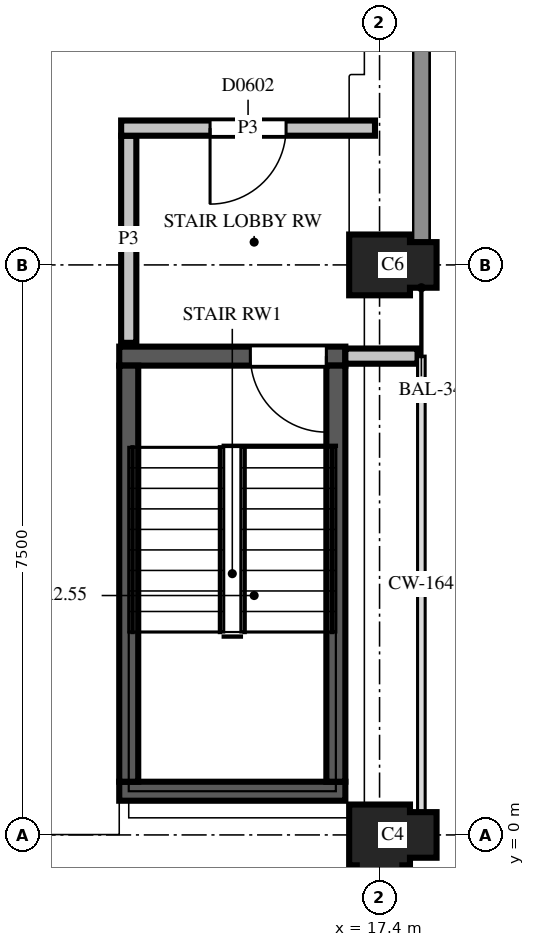
"""IFC4 building model, lengths in metres.
Left out: names, types, materials, properties, quantities, classifications, styles, units other than length and angle.
Written with IfcOpenShell. Run it as: python <this file> out.ifc"""

import sys

from ifc_helpers import new_model, si_unit, direction, frame, frame_2d, origin, place, context, subcontext, project, spatial, polyline, rectangle, outline, extrude, element, fill, save


model = new_model("IFC4")
c1 = context("Model", 3, precision=1e-05, world=origin(), true_north=direction((0.0, 1.0)))
c2 = subcontext(c1, "Body", "Model", "MODEL_VIEW")
j1 = project(units=[si_unit("LENGTHUNIT", "METRE"), si_unit("PLANEANGLEUNIT", "RADIAN")], contexts=[c1])
p1 = place(None, origin())
s1 = spatial("IfcSite", under=j1, at=p1, CompositionType="ELEMENT")
p2 = place(p1, origin())
s2 = spatial("IfcBuilding", under=s1, at=p2, CompositionType="ELEMENT")
p3 = place(p2, frame((0.0, 0.0, 23.0)))
s3 = spatial("IfcBuildingStorey", under=s2, at=p3, CompositionType="ELEMENT", Elevation=23.0)
p4 = place(p3, frame((17.4, 0.0, 0.0), z_axis=(0.0, 0.0, 1.0), x_axis=(0.0, -1.0, 0.0)))
e1 = element("IfcColumn", 1, at=p4, inside=s3, PredefinedType="COLUMN", context=c2, shape_type="SweptSolid", body=[
    extrude(outline(polyline([(-0.4, -0.4), (0.4, -0.4), (0.4, -0.3), (0.75, -0.3), (0.75, 0.3), (0.4, 0.3), (0.4, 0.4), (0.3, 0.4), (0.3, 0.75), (-0.3, 0.75), (-0.3, 0.4), (-0.4, 0.4), (-0.4, -0.4)])), origin(), (0.0, 0.0, 1.0), 3.7),
])
p5 = place(p3, frame((17.4, 7.5, 0.0), z_axis=(0.0, 0.0, 1.0), x_axis=(1.0, 0.0, 0.0)))
e2 = element("IfcColumn", 2, at=p5, inside=s3, PredefinedType="COLUMN", context=c2, shape_type="SweptSolid", body=[
    extrude(outline(polyline([(-0.4, -0.4), (0.4, -0.4), (0.4, -0.3), (0.75, -0.3), (0.75, 0.3), (0.4, 0.3), (0.4, 0.4), (-0.4, 0.4), (-0.4, -0.4)])), origin(), (0.0, 0.0, 1.0), 3.7),
])
p6 = place(p3, frame((13.975, 0.575, 0.0), z_axis=(0.0, 0.0, 1.0), x_axis=(1.0, 0.0, 0.0)))
e3 = element("IfcWall", 3, at=p6, inside=s3, PredefinedType="SHEAR", context=c2, shape_type="SweptSolid", body=[
    extrude(rectangle(XDim=2.975, YDim=0.25, at=frame_2d((1.487, 0.0))), origin(), (0.0, 0.0, 1.0), 3.7),
])
p7 = place(p3, frame((13.975, 6.3, 0.0), z_axis=(0.0, 0.0, 1.0), x_axis=(1.0, 0.0, 0.0)))
e4 = element("IfcWall", 4, at=p7, inside=s3, PredefinedType="SHEAR", context=c2, shape_type="SweptSolid", body=[
    extrude(rectangle(XDim=2.975, YDim=0.25, at=frame_2d((1.487, 0.0))), origin(), (0.0, 0.0, 1.0), 3.7),
])
p8 = place(p7, frame((1.725, 0.0, 0.0)))
e5 = element("IfcOpeningElement", 5, at=p8, cuts=e4, PredefinedType="OPENING", context=c2, shape_type="SweptSolid", body=[
    extrude(rectangle(XDim=1.0, YDim=2.1, at=frame_2d((0.5, 1.05))), frame((0.0, 0.135, 0.0), z_axis=(0.0, -1.0, 0.0), x_axis=(1.0, 0.0, 0.0)), (0.0, 0.0, 1.0), 0.27),
])
for number, where, z_axis, x_axis in (
    (6, (14.1, 0.7, 0.0), (0.0, 0.0, 1.0), (0.0, 1.0, 0.0)),
    (7, (16.825, 0.7, 0.0), (0.0, 0.0, 1.0), (0.0, 1.0, 0.0)),
):
    element("IfcWall", number, at=place(p3, frame(where, z_axis=z_axis, x_axis=x_axis)), inside=s3, PredefinedType="SHEAR", context=c2, shape_type="SweptSolid", body=[
        extrude(rectangle(XDim=5.475, YDim=0.25, at=frame_2d((2.738, 0.0))), origin(), (0.0, 0.0, 1.0), 3.7),
    ])
p9 = place(p3, frame((16.95, 6.3, 0.0), z_axis=(0.0, 0.0, 1.0), x_axis=(1.0, 0.0, 0.0)))
e8 = element("IfcWall", 8, at=p9, inside=s3, PredefinedType="PARTITIONING", context=c2, shape_type="SweptSolid", body=[
    extrude(rectangle(XDim=0.95, YDim=0.2, at=frame_2d((0.475, 0.0))), origin(), (0.0, 0.0, 1.0), 2.88),
])
p10 = place(p3, frame((14.1, 9.2, 0.0), z_axis=(0.0, 0.0, 1.0), x_axis=(0.0, -1.0, 0.0)))
e9 = element("IfcWall", 9, at=p10, inside=s3, PredefinedType="PARTITIONING", context=c2, shape_type="SweptSolid", body=[
    extrude(rectangle(XDim=2.725, YDim=0.2, at=frame_2d((1.362, 0.0))), origin(), (0.0, 0.0, 1.0), 2.88),
])
p11 = place(p3, frame((17.34, 9.3, 0.0), z_axis=(0.0, 0.0, 1.0), x_axis=(-1.0, 0.0, 0.0)))
e10 = element("IfcWall", 10, at=p11, inside=s3, PredefinedType="PARTITIONING", context=c2, shape_type="SweptSolid", body=[
    extrude(rectangle(XDim=3.34, YDim=0.2, at=frame_2d((1.67, 0.0))), origin(), (0.0, 0.0, 1.0), 2.88),
])
p12 = place(p11, frame((1.17, 0.0, 0.0)))
e11 = element("IfcOpeningElement", 11, at=p12, cuts=e10, PredefinedType="OPENING", context=c2, shape_type="SweptSolid", body=[
    extrude(rectangle(XDim=1.0, YDim=2.1, at=frame_2d((0.5, 1.05))), frame((0.0, 0.11, 0.0), z_axis=(0.0, -1.0, 0.0), x_axis=(1.0, 0.0, 0.0)), (0.0, 0.0, 1.0), 0.22),
])
p13 = place(p12, origin())
e12 = element("IfcDoor", 12, at=p13, inside=s3, OperationType="SINGLE_SWING_LEFT", PredefinedType="DOOR", context=c2, shape_type="SweptSolid", body=[
    extrude(rectangle(XDim=1.0, YDim=2.1, at=frame_2d((0.5, 1.05))), frame((0.0, 0.025, 0.0), z_axis=(0.0, -1.0, 0.0), x_axis=(1.0, 0.0, 0.0)), (0.0, 0.0, 1.0), 0.05),
])
fill(e11, e12)
p14 = place(p8, origin())
e13 = element("IfcDoor", 13, at=p14, inside=s3, OperationType="SINGLE_SWING_RIGHT", PredefinedType="DOOR", context=c2, shape_type="SweptSolid", body=[
    extrude(rectangle(XDim=1.0, YDim=2.1, at=frame_2d((0.5, 1.05))), frame((0.0, 0.025, 0.0), z_axis=(0.0, -1.0, 0.0), x_axis=(1.0, 0.0, 0.0)), (0.0, 0.0, 1.0), 0.05),
])
fill(e5, e13)
save(model, sys.argv[1])
